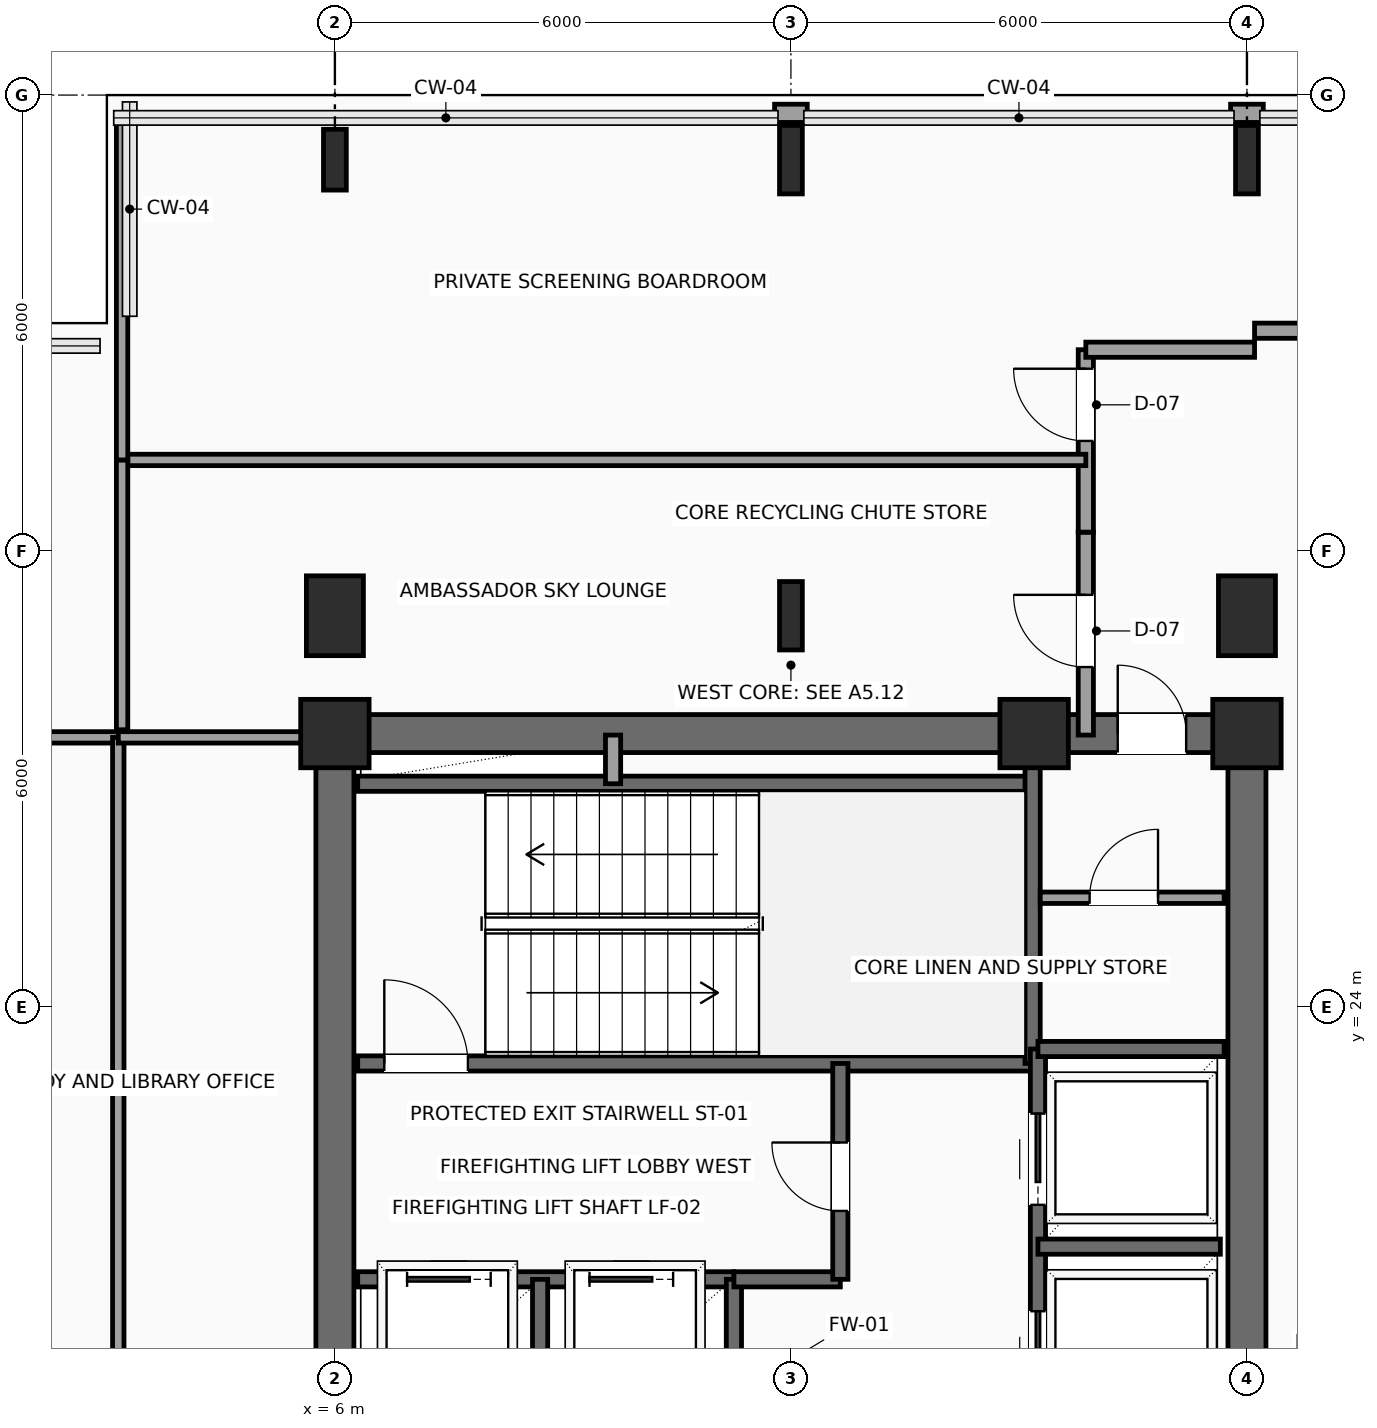
"""IFC4 building model, lengths in metres.
Left out: names, types, materials, properties, quantities, classifications, styles, units other than length and angle.
Written with IfcOpenShell. Run it as: python <this file> out.ifc"""

import sys

from ifc_helpers import new_model, si_unit, direction, frame, frame_2d, origin, origin_2d, place, context, subcontext, project, spatial, rectangle, i_section, extrude, element, fill, save


model = new_model("IFC4")
c1 = context("Model", 3, precision=1e-05, world=origin(), true_north=direction((0.0, 1.0)))
c2 = subcontext(c1, "Body", "Model", "MODEL_VIEW")
j1 = project(units=[si_unit("LENGTHUNIT", "METRE"), si_unit("PLANEANGLEUNIT", "RADIAN")], contexts=[c1])
p1 = place(None, origin())
s1 = spatial("IfcSite", under=j1, at=p1, CompositionType="ELEMENT")
p2 = place(p1, origin())
s2 = spatial("IfcBuilding", under=s1, at=p2, CompositionType="ELEMENT")
p3 = place(p2, frame((0.0, 0.0, 219.9)))
s3 = spatial("IfcBuildingStorey", under=s2, at=p3, CompositionType="ELEMENT", Elevation=219.9)
for number, where, z_axis, x_axis in (
    (1, (6.0, 27.6, 0.0), (0.0, 0.0, 1.0), (1.0, 0.0, 0.0)),
    (2, (15.2, 27.6, 0.0), (0.0, 0.0, 1.0), (1.0, 0.0, 0.0)),
    (3, (18.0, 27.6, 0.0), (0.0, 0.0, 1.0), (1.0, 0.0, 0.0)),
):
    element("IfcColumn", number, at=place(p3, frame(where, z_axis=z_axis, x_axis=x_axis)), inside=s3, PredefinedType="COLUMN", context=c2, shape_type="SweptSolid", body=[
        extrude(rectangle(XDim=0.9, YDim=0.9, at=origin_2d()), origin(), (0.0, 0.0, 1.0), 3.75),
    ])
p4 = place(p3, frame((6.0, 29.15, 0.0), z_axis=(0.0, 0.0, 1.0), x_axis=(1.0, 0.0, 0.0)))
e4 = element("IfcColumn", 4, at=p4, inside=s3, PredefinedType="COLUMN", context=c2, shape_type="SweptSolid", body=[
    extrude(rectangle(XDim=0.75, YDim=1.05, at=origin_2d()), origin(), (0.0, 0.0, 1.0), 3.75),
])
p5 = place(p3, frame((6.0, 35.15, 0.0), z_axis=(0.0, 0.0, 1.0), x_axis=(1.0, 0.0, 0.0)))
e5 = element("IfcColumn", 5, at=p5, inside=s3, PredefinedType="COLUMN", context=c2, shape_type="SweptSolid", body=[
    extrude(i_section(OverallWidth=0.3, OverallDepth=0.8, WebThickness=0.018, FlangeThickness=0.033, FilletRadius=0.03, at=origin_2d()), origin(), (0.0, 0.0, 1.0), 3.75),
])
for number, where, z_axis, x_axis in (
    (6, (12.0, 29.15, 0.0), (0.0, 0.0, 1.0), (1.0, 0.0, 0.0)),
    (7, (12.0, 35.15, 0.0), (0.0, 0.0, 1.0), (1.0, 0.0, 0.0)),
):
    element("IfcColumn", number, at=place(p3, frame(where, z_axis=z_axis, x_axis=x_axis)), inside=s3, PredefinedType="COLUMN", context=c2, shape_type="SweptSolid", body=[
        extrude(i_section(OverallWidth=0.3, OverallDepth=0.9, WebThickness=0.019, FlangeThickness=0.035, FilletRadius=0.03, at=origin_2d()), origin(), (0.0, 0.0, 1.0), 3.75),
    ])
p6 = place(p3, frame((18.0, 29.15, 0.0), z_axis=(0.0, 0.0, 1.0), x_axis=(1.0, 0.0, 0.0)))
e8 = element("IfcColumn", 8, at=p6, inside=s3, PredefinedType="COLUMN", context=c2, shape_type="SweptSolid", body=[
    extrude(rectangle(XDim=0.75, YDim=1.05, at=origin_2d()), origin(), (0.0, 0.0, 1.0), 3.75),
])
p7 = place(p3, frame((18.0, 35.15, 0.0), z_axis=(0.0, 0.0, 1.0), x_axis=(1.0, 0.0, 0.0)))
e9 = element("IfcColumn", 9, at=p7, inside=s3, PredefinedType="COLUMN", context=c2, shape_type="SweptSolid", body=[
    extrude(i_section(OverallWidth=0.3, OverallDepth=0.9, WebThickness=0.019, FlangeThickness=0.035, FilletRadius=0.03, at=origin_2d()), origin(), (0.0, 0.0, 1.0), 3.75),
])
for number, where, z_axis, x_axis in (
    (10, (11.785, 35.76, 0.0), (0.0, 0.0, 1.0), (1.0, 0.0, 0.0)),
    (11, (17.785, 35.76, 0.0), (0.0, 0.0, 1.0), (1.0, 0.0, 0.0)),
):
    element("IfcWall", number, at=place(p3, frame(where, z_axis=z_axis, x_axis=x_axis)), inside=s3, PredefinedType="SOLIDWALL", context=c2, shape_type="SweptSolid", body=[
        extrude(rectangle(XDim=0.43, YDim=0.24, at=frame_2d((0.215, 0.0))), origin(), (0.0, 0.0, 1.0), 3.54),
    ])
p8 = place(p3, frame((6.0, 27.6, 0.0), z_axis=(0.0, 0.0, 1.0), x_axis=(1.0, 0.0, 0.0)))
e12 = element("IfcWall", 12, at=p8, inside=s3, PredefinedType="SHEAR", context=c2, shape_type="SweptSolid", body=[
    extrude(rectangle(XDim=12.0, YDim=0.5, at=frame_2d((6.0, 0.0))), origin(), (0.0, 0.0, 1.0), 3.54),
])
p9 = place(p8, frame((10.3, 0.0, 0.0)))
e13 = element("IfcOpeningElement", 13, at=p9, cuts=e12, PredefinedType="OPENING", context=c2, shape_type="SweptSolid", body=[
    extrude(rectangle(XDim=0.9, YDim=2.15, at=frame_2d((0.45, 1.075))), frame((0.0, 0.26, 0.0), z_axis=(0.0, -1.0, 0.0), x_axis=(1.0, 0.0, 0.0)), (0.0, 0.0, 1.0), 0.52),
])
for number, where, z_axis, x_axis in (
    (14, (6.0, 18.0, 0.0), (0.0, 0.0, 1.0), (0.0, 1.0, 0.0)),
    (15, (18.0, 18.0, 0.0), (0.0, 0.0, 1.0), (0.0, 1.0, 0.0)),
):
    element("IfcWall", number, at=place(p3, frame(where, z_axis=z_axis, x_axis=x_axis)), inside=s3, PredefinedType="SHEAR", context=c2, shape_type="SweptSolid", body=[
        extrude(rectangle(XDim=9.6, YDim=0.5, at=frame_2d((4.8, 0.0))), origin(), (0.0, 0.0, 1.0), 3.54),
    ])
p10 = place(p3, frame((6.3, 23.26, 0.0), z_axis=(0.0, 0.0, 1.0), x_axis=(1.0, 0.0, 0.0)))
e16 = element("IfcWall", 16, at=p10, inside=s3, PredefinedType="SHEAR", context=c2, shape_type="SweptSolid", body=[
    extrude(rectangle(XDim=8.88, YDim=0.2, at=frame_2d((4.44, 0.0))), origin(), (0.0, 0.0, 1.0), 3.54),
])
p11 = place(p10, frame((0.35, 0.0, 0.0)))
e17 = element("IfcOpeningElement", 17, at=p11, cuts=e16, PredefinedType="OPENING", context=c2, shape_type="SweptSolid", body=[
    extrude(rectangle(XDim=1.1, YDim=2.2, at=frame_2d((0.55, 1.1))), frame((0.0, 0.11, 0.0), z_axis=(0.0, -1.0, 0.0), x_axis=(1.0, 0.0, 0.0)), (0.0, 0.0, 1.0), 0.22),
])
p12 = place(p3, frame((6.3, 26.94, 0.0), z_axis=(0.0, 0.0, 1.0), x_axis=(1.0, 0.0, 0.0)))
e18 = element("IfcWall", 18, at=p12, inside=s3, PredefinedType="SHEAR", context=c2, shape_type="SweptSolid", body=[
    extrude(rectangle(XDim=8.88, YDim=0.2, at=frame_2d((4.44, 0.0))), origin(), (0.0, 0.0, 1.0), 3.54),
])
p13 = place(p3, frame((15.18, 23.26, 0.0), z_axis=(0.0, 0.0, 1.0), x_axis=(0.0, 1.0, 0.0)))
e19 = element("IfcWall", 19, at=p13, inside=s3, PredefinedType="SHEAR", context=c2, shape_type="SweptSolid", body=[
    extrude(rectangle(XDim=4.04, YDim=0.2, at=frame_2d((2.02, 0.0))), origin(), (0.0, 0.0, 1.0), 3.54),
])
p14 = place(p3, frame((6.3, 20.42, 0.0), z_axis=(0.0, 0.0, 1.0), x_axis=(1.0, 0.0, 0.0)))
e20 = element("IfcWall", 20, at=p14, inside=s3, PredefinedType="SHEAR", context=c2, shape_type="SweptSolid", body=[
    extrude(rectangle(XDim=4.95, YDim=0.2, at=frame_2d((2.475, 0.0))), origin(), (0.0, 0.0, 1.0), 3.54),
])
p15 = place(p14, frame((0.65, 0.0, 0.0)))
e21 = element("IfcOpeningElement", 21, at=p15, cuts=e20, PredefinedType="OPENING", context=c2, shape_type="SweptSolid", body=[
    extrude(rectangle(XDim=1.1, YDim=2.2, at=frame_2d((0.55, 1.1))), frame((0.0, 0.11, 0.0), z_axis=(0.0, -1.0, 0.0), x_axis=(1.0, 0.0, 0.0)), (0.0, 0.0, 1.0), 0.22),
])
p16 = place(p14, frame((3.05, 0.0, 0.0)))
e22 = element("IfcOpeningElement", 22, at=p16, cuts=e20, PredefinedType="OPENING", context=c2, shape_type="SweptSolid", body=[
    extrude(rectangle(XDim=1.1, YDim=2.2, at=frame_2d((0.55, 1.1))), frame((0.0, 0.11, 0.0), z_axis=(0.0, -1.0, 0.0), x_axis=(1.0, 0.0, 0.0)), (0.0, 0.0, 1.0), 0.22),
])
for number, where, z_axis, x_axis in (
    (23, (8.7, 18.25, 0.0), (0.0, 0.0, 1.0), (0.0, 1.0, 0.0)),
    (24, (11.25, 18.25, 0.0), (0.0, 0.0, 1.0), (0.0, 1.0, 0.0)),
):
    element("IfcWall", number, at=place(p3, frame(where, z_axis=z_axis, x_axis=x_axis)), inside=s3, PredefinedType="SHEAR", context=c2, shape_type="SweptSolid", body=[
        extrude(rectangle(XDim=2.17, YDim=0.2, at=frame_2d((1.085, 0.0))), origin(), (0.0, 0.0, 1.0), 3.54),
    ])
p17 = place(p3, frame((11.25, 20.42, 0.0), z_axis=(0.0, 0.0, 1.0), x_axis=(1.0, 0.0, 0.0)))
e25 = element("IfcWall", 25, at=p17, inside=s3, PredefinedType="SHEAR", context=c2, shape_type="SweptSolid", body=[
    extrude(rectangle(XDim=1.4, YDim=0.2, at=frame_2d((0.7, 0.0))), origin(), (0.0, 0.0, 1.0), 3.54),
])
p18 = place(p3, frame((12.65, 20.42, 0.0), z_axis=(0.0, 0.0, 1.0), x_axis=(0.0, 1.0, 0.0)))
e26 = element("IfcWall", 26, at=p18, inside=s3, PredefinedType="SHEAR", context=c2, shape_type="SweptSolid", body=[
    extrude(rectangle(XDim=2.84, YDim=0.2, at=frame_2d((1.42, 0.0))), origin(), (0.0, 0.0, 1.0), 3.54),
])
p19 = place(p18, frame((0.9, 0.0, 0.0)))
e27 = element("IfcOpeningElement", 27, at=p19, cuts=e26, PredefinedType="OPENING", context=c2, shape_type="SweptSolid", body=[
    extrude(rectangle(XDim=0.9, YDim=2.15, at=frame_2d((0.45, 1.075))), frame((0.0, 0.11, 0.0), z_axis=(0.0, -1.0, 0.0), x_axis=(1.0, 0.0, 0.0)), (0.0, 0.0, 1.0), 0.22),
])
p20 = place(p3, frame((9.66, 26.94, 0.0), z_axis=(0.0, 0.0, 1.0), x_axis=(0.0, 1.0, 0.0)))
e28 = element("IfcWall", 28, at=p20, inside=s3, PredefinedType="SOLIDWALL", context=c2, shape_type="SweptSolid", body=[
    extrude(rectangle(XDim=0.64, YDim=0.2, at=frame_2d((0.32, 0.0))), origin(), (0.0, 0.0, 1.0), 3.54),
])
p21 = place(p3, frame((15.25, 18.25, 0.0), z_axis=(0.0, 0.0, 1.0), x_axis=(0.0, 1.0, 0.0)))
e29 = element("IfcWall", 29, at=p21, inside=s3, PredefinedType="SHEAR", context=c2, shape_type="SweptSolid", body=[
    extrude(rectangle(XDim=5.2, YDim=0.2, at=frame_2d((2.6, 0.0))), origin(), (0.0, 0.0, 1.0), 3.54),
])
p22 = place(p21, frame((0.55, 0.0, 0.0)))
e30 = element("IfcOpeningElement", 30, at=p22, cuts=e29, PredefinedType="OPENING", context=c2, shape_type="SweptSolid", body=[
    extrude(rectangle(XDim=1.2, YDim=2.2, at=frame_2d((0.6, 1.1))), frame((0.0, 0.11, 0.0), z_axis=(0.0, -1.0, 0.0), x_axis=(1.0, 0.0, 0.0)), (0.0, 0.0, 1.0), 0.22),
])
p23 = place(p21, frame((3.15, 0.0, 0.0)))
e31 = element("IfcOpeningElement", 31, at=p23, cuts=e29, PredefinedType="OPENING", context=c2, shape_type="SweptSolid", body=[
    extrude(rectangle(XDim=1.2, YDim=2.2, at=frame_2d((0.6, 1.1))), frame((0.0, 0.11, 0.0), z_axis=(0.0, -1.0, 0.0), x_axis=(1.0, 0.0, 0.0)), (0.0, 0.0, 1.0), 0.22),
])
p24 = place(p3, frame((15.25, 20.85, 0.0), z_axis=(0.0, 0.0, 1.0), x_axis=(1.0, 0.0, 0.0)))
e32 = element("IfcWall", 32, at=p24, inside=s3, PredefinedType="SHEAR", context=c2, shape_type="SweptSolid", body=[
    extrude(rectangle(XDim=2.4, YDim=0.2, at=frame_2d((1.2, 0.0))), origin(), (0.0, 0.0, 1.0), 3.54),
])
p25 = place(p3, frame((15.25, 23.45, 0.0), z_axis=(0.0, 0.0, 1.0), x_axis=(1.0, 0.0, 0.0)))
e33 = element("IfcWall", 33, at=p25, inside=s3, PredefinedType="SHEAR", context=c2, shape_type="SweptSolid", body=[
    extrude(rectangle(XDim=2.45, YDim=0.2, at=frame_2d((1.225, 0.0))), origin(), (0.0, 0.0, 1.0), 3.54),
])
p26 = place(p3, frame((15.28, 25.44, 0.0), z_axis=(0.0, 0.0, 1.0), x_axis=(1.0, 0.0, 0.0)))
e34 = element("IfcWall", 34, at=p26, inside=s3, PredefinedType="PARTITIONING", context=c2, shape_type="SweptSolid", body=[
    extrude(rectangle(XDim=2.42, YDim=0.15, at=frame_2d((1.21, 0.0))), origin(), (0.0, 0.0, 1.0), 3.54),
])
p27 = place(p26, frame((0.65, 0.0, 0.0)))
e35 = element("IfcOpeningElement", 35, at=p27, cuts=e34, PredefinedType="OPENING", context=c2, shape_type="SweptSolid", body=[
    extrude(rectangle(XDim=0.9, YDim=2.15, at=frame_2d((0.45, 1.075))), frame((0.0, 0.085, 0.0), z_axis=(0.0, -1.0, 0.0), x_axis=(1.0, 0.0, 0.0)), (0.0, 0.0, 1.0), 0.17),
])
p28 = place(p3, frame((15.88, 27.58, 0.0), z_axis=(0.0, 0.0, 1.0), x_axis=(0.0, 1.0, 0.0)))
e36 = element("IfcWall", 36, at=p28, inside=s3, PredefinedType="SOLIDWALL", context=c2, shape_type="SweptSolid", body=[
    extrude(rectangle(XDim=2.67, YDim=0.2, at=frame_2d((1.335, 0.0))), origin(), (0.0, 0.0, 1.0), 3.54),
])
p29 = place(p28, frame((0.895, 0.0, 0.0)))
e37 = element("IfcOpeningElement", 37, at=p29, cuts=e36, PredefinedType="OPENING", context=c2, shape_type="SweptSolid", body=[
    extrude(rectangle(XDim=0.95, YDim=2.15, at=frame_2d((0.475, 1.075))), frame((0.0, 0.11, 0.0), z_axis=(0.0, -1.0, 0.0), x_axis=(1.0, 0.0, 0.0)), (0.0, 0.0, 1.0), 0.22),
])
p30 = place(p3, frame((15.88, 30.25, 0.0), z_axis=(0.0, 0.0, 1.0), x_axis=(0.0, 1.0, 0.0)))
e38 = element("IfcWall", 38, at=p30, inside=s3, PredefinedType="SOLIDWALL", context=c2, shape_type="SweptSolid", body=[
    extrude(rectangle(XDim=2.4, YDim=0.2, at=frame_2d((1.2, 0.0))), origin(), (0.0, 0.0, 1.0), 3.54),
])
p31 = place(p30, frame((1.2, 0.0, 0.0)))
e39 = element("IfcOpeningElement", 39, at=p31, cuts=e38, PredefinedType="OPENING", context=c2, shape_type="SweptSolid", body=[
    extrude(rectangle(XDim=0.95, YDim=2.15, at=frame_2d((0.475, 1.075))), frame((0.0, 0.11, 0.0), z_axis=(0.0, -1.0, 0.0), x_axis=(1.0, 0.0, 0.0)), (0.0, 0.0, 1.0), 0.22),
])
p32 = place(p3, frame((15.88, 32.65, 0.0), z_axis=(0.0, 0.0, 1.0), x_axis=(1.0, 0.0, 0.0)))
e40 = element("IfcWall", 40, at=p32, inside=s3, PredefinedType="SOLIDWALL", context=c2, shape_type="SweptSolid", body=[
    extrude(rectangle(XDim=2.22, YDim=0.2, at=frame_2d((1.11, 0.0))), origin(), (0.0, 0.0, 1.0), 3.54),
])
p33 = place(p3, frame((18.1, 32.9, 0.0), z_axis=(0.0, 0.0, 1.0), x_axis=(1.0, 0.0, 0.0)))
e41 = element("IfcWall", 41, at=p33, inside=s3, PredefinedType="SOLIDWALL", context=c2, shape_type="SweptSolid", body=[
    extrude(rectangle(XDim=2.35, YDim=0.2, at=frame_2d((1.175, 0.0))), origin(), (0.0, 0.0, 1.0), 3.54),
])
p34 = place(p3, frame((0.3, 27.55, 0.0), z_axis=(0.0, 0.0, 1.0), x_axis=(1.0, 0.0, 0.0)))
e42 = element("IfcWall", 42, at=p34, inside=s3, PredefinedType="PARTITIONING", context=c2, shape_type="SweptSolid", body=[
    extrude(rectangle(XDim=2.85, YDim=0.15, at=frame_2d((1.425, 0.0))), origin(), (0.0, 0.0, 1.0), 3.54),
])
p35 = place(p3, frame((3.15, 17.55, 0.0), z_axis=(0.0, 0.0, 1.0), x_axis=(0.0, 1.0, 0.0)))
e43 = element("IfcWall", 43, at=p35, inside=s3, PredefinedType="PARTITIONING", context=c2, shape_type="SweptSolid", body=[
    extrude(rectangle(XDim=10.0, YDim=0.15, at=frame_2d((5.0, 0.0))), origin(), (0.0, 0.0, 1.0), 3.54),
])
p36 = place(p3, frame((3.15, 27.55, 0.0), z_axis=(0.0, 0.0, 1.0), x_axis=(1.0, 0.0, 0.0)))
e44 = element("IfcWall", 44, at=p36, inside=s3, PredefinedType="PARTITIONING", context=c2, shape_type="SweptSolid", body=[
    extrude(rectangle(XDim=2.8, YDim=0.15, at=frame_2d((1.4, 0.0))), origin(), (0.0, 0.0, 1.0), 3.54),
])
p37 = place(p3, frame((3.2, 31.2, 0.0), z_axis=(0.0, 0.0, 1.0), x_axis=(1.0, 0.0, 0.0)))
e45 = element("IfcWall", 45, at=p37, inside=s3, PredefinedType="PARTITIONING", context=c2, shape_type="SweptSolid", body=[
    extrude(rectangle(XDim=12.68, YDim=0.15, at=frame_2d((6.34, 0.0))), origin(), (0.0, 0.0, 1.0), 3.54),
])
p38 = place(p3, frame((3.2, 27.65, 0.0), z_axis=(0.0, 0.0, 1.0), x_axis=(0.0, 1.0, 0.0)))
e46 = element("IfcWall", 46, at=p38, inside=s3, PredefinedType="PARTITIONING", context=c2, shape_type="SweptSolid", body=[
    extrude(rectangle(XDim=3.55, YDim=0.15, at=frame_2d((1.775, 0.0))), origin(), (0.0, 0.0, 1.0), 3.54),
])
p39 = place(p3, frame((3.2, 31.2, 0.0), z_axis=(0.0, 0.0, 1.0), x_axis=(0.0, 1.0, 0.0)))
e47 = element("IfcWall", 47, at=p39, inside=s3, PredefinedType="PARTITIONING", context=c2, shape_type="SweptSolid", body=[
    extrude(rectangle(XDim=4.5, YDim=0.15, at=frame_2d((2.25, 0.0))), origin(), (0.0, 0.0, 1.0), 3.54),
])
p40 = place(p9, origin())
e48 = element("IfcDoor", 48, at=p40, inside=s3, OperationType="SINGLE_SWING_LEFT", PredefinedType="DOOR", context=c2, shape_type="SweptSolid", body=[
    extrude(rectangle(XDim=0.9, YDim=2.15, at=frame_2d((0.45, 1.075))), frame((0.0, 0.025, 0.0), z_axis=(0.0, -1.0, 0.0), x_axis=(1.0, 0.0, 0.0)), (0.0, 0.0, 1.0), 0.05),
])
fill(e13, e48)
p41 = place(p11, origin())
e49 = element("IfcDoor", 49, at=p41, inside=s3, OperationType="SINGLE_SWING_LEFT", PredefinedType="DOOR", context=c2, shape_type="SweptSolid", body=[
    extrude(rectangle(XDim=1.1, YDim=2.2, at=frame_2d((0.55, 1.1))), frame((0.0, 0.025, 0.0), z_axis=(0.0, -1.0, 0.0), x_axis=(1.0, 0.0, 0.0)), (0.0, 0.0, 1.0), 0.05),
])
fill(e17, e49)
p42 = place(p15, origin())
e50 = element("IfcDoor", 50, at=p42, inside=s3, OperationType="SLIDING_TO_LEFT", PredefinedType="DOOR", context=c2, shape_type="SweptSolid", body=[
    extrude(rectangle(XDim=1.1, YDim=2.2, at=frame_2d((0.55, 1.1))), frame((0.0, 0.025, 0.0), z_axis=(0.0, -1.0, 0.0), x_axis=(1.0, 0.0, 0.0)), (0.0, 0.0, 1.0), 0.05),
])
fill(e21, e50)
p43 = place(p16, origin())
e51 = element("IfcDoor", 51, at=p43, inside=s3, OperationType="SLIDING_TO_LEFT", PredefinedType="DOOR", context=c2, shape_type="SweptSolid", body=[
    extrude(rectangle(XDim=1.1, YDim=2.2, at=frame_2d((0.55, 1.1))), frame((0.0, 0.025, 0.0), z_axis=(0.0, -1.0, 0.0), x_axis=(1.0, 0.0, 0.0)), (0.0, 0.0, 1.0), 0.05),
])
fill(e22, e51)
p44 = place(p19, origin())
e52 = element("IfcDoor", 52, at=p44, inside=s3, OperationType="SINGLE_SWING_RIGHT", PredefinedType="DOOR", context=c2, shape_type="SweptSolid", body=[
    extrude(rectangle(XDim=0.9, YDim=2.15, at=frame_2d((0.45, 1.075))), frame((0.0, 0.025, 0.0), z_axis=(0.0, -1.0, 0.0), x_axis=(1.0, 0.0, 0.0)), (0.0, 0.0, 1.0), 0.05),
])
fill(e27, e52)
p45 = place(p22, origin())
e53 = element("IfcDoor", 53, at=p45, inside=s3, OperationType="SLIDING_TO_RIGHT", PredefinedType="DOOR", context=c2, shape_type="SweptSolid", body=[
    extrude(rectangle(XDim=1.2, YDim=2.2, at=frame_2d((0.6, 1.1))), frame((0.0, 0.025, 0.0), z_axis=(0.0, -1.0, 0.0), x_axis=(1.0, 0.0, 0.0)), (0.0, 0.0, 1.0), 0.05),
])
fill(e30, e53)
p46 = place(p23, origin())
e54 = element("IfcDoor", 54, at=p46, inside=s3, OperationType="SLIDING_TO_RIGHT", PredefinedType="DOOR", context=c2, shape_type="SweptSolid", body=[
    extrude(rectangle(XDim=1.2, YDim=2.2, at=frame_2d((0.6, 1.1))), frame((0.0, 0.025, 0.0), z_axis=(0.0, -1.0, 0.0), x_axis=(1.0, 0.0, 0.0)), (0.0, 0.0, 1.0), 0.05),
])
fill(e31, e54)
p47 = place(p27, origin())
e55 = element("IfcDoor", 55, at=p47, inside=s3, OperationType="SINGLE_SWING_RIGHT", PredefinedType="DOOR", context=c2, shape_type="SweptSolid", body=[
    extrude(rectangle(XDim=0.9, YDim=2.15, at=frame_2d((0.45, 1.075))), frame((0.0, 0.025, 0.0), z_axis=(0.0, -1.0, 0.0), x_axis=(1.0, 0.0, 0.0)), (0.0, 0.0, 1.0), 0.05),
])
fill(e35, e55)
p48 = place(p29, origin())
e56 = element("IfcDoor", 56, at=p48, inside=s3, OperationType="SINGLE_SWING_RIGHT", PredefinedType="DOOR", context=c2, shape_type="SweptSolid", body=[
    extrude(rectangle(XDim=0.95, YDim=2.15, at=frame_2d((0.475, 1.075))), frame((0.0, 0.025, 0.0), z_axis=(0.0, -1.0, 0.0), x_axis=(1.0, 0.0, 0.0)), (0.0, 0.0, 1.0), 0.05),
])
fill(e37, e56)
p49 = place(p31, origin())
e57 = element("IfcDoor", 57, at=p49, inside=s3, OperationType="SINGLE_SWING_RIGHT", PredefinedType="DOOR", context=c2, shape_type="SweptSolid", body=[
    extrude(rectangle(XDim=0.95, YDim=2.15, at=frame_2d((0.475, 1.075))), frame((0.0, 0.025, 0.0), z_axis=(0.0, -1.0, 0.0), x_axis=(1.0, 0.0, 0.0)), (0.0, 0.0, 1.0), 0.05),
])
fill(e39, e57)
save(model, sys.argv[1])
